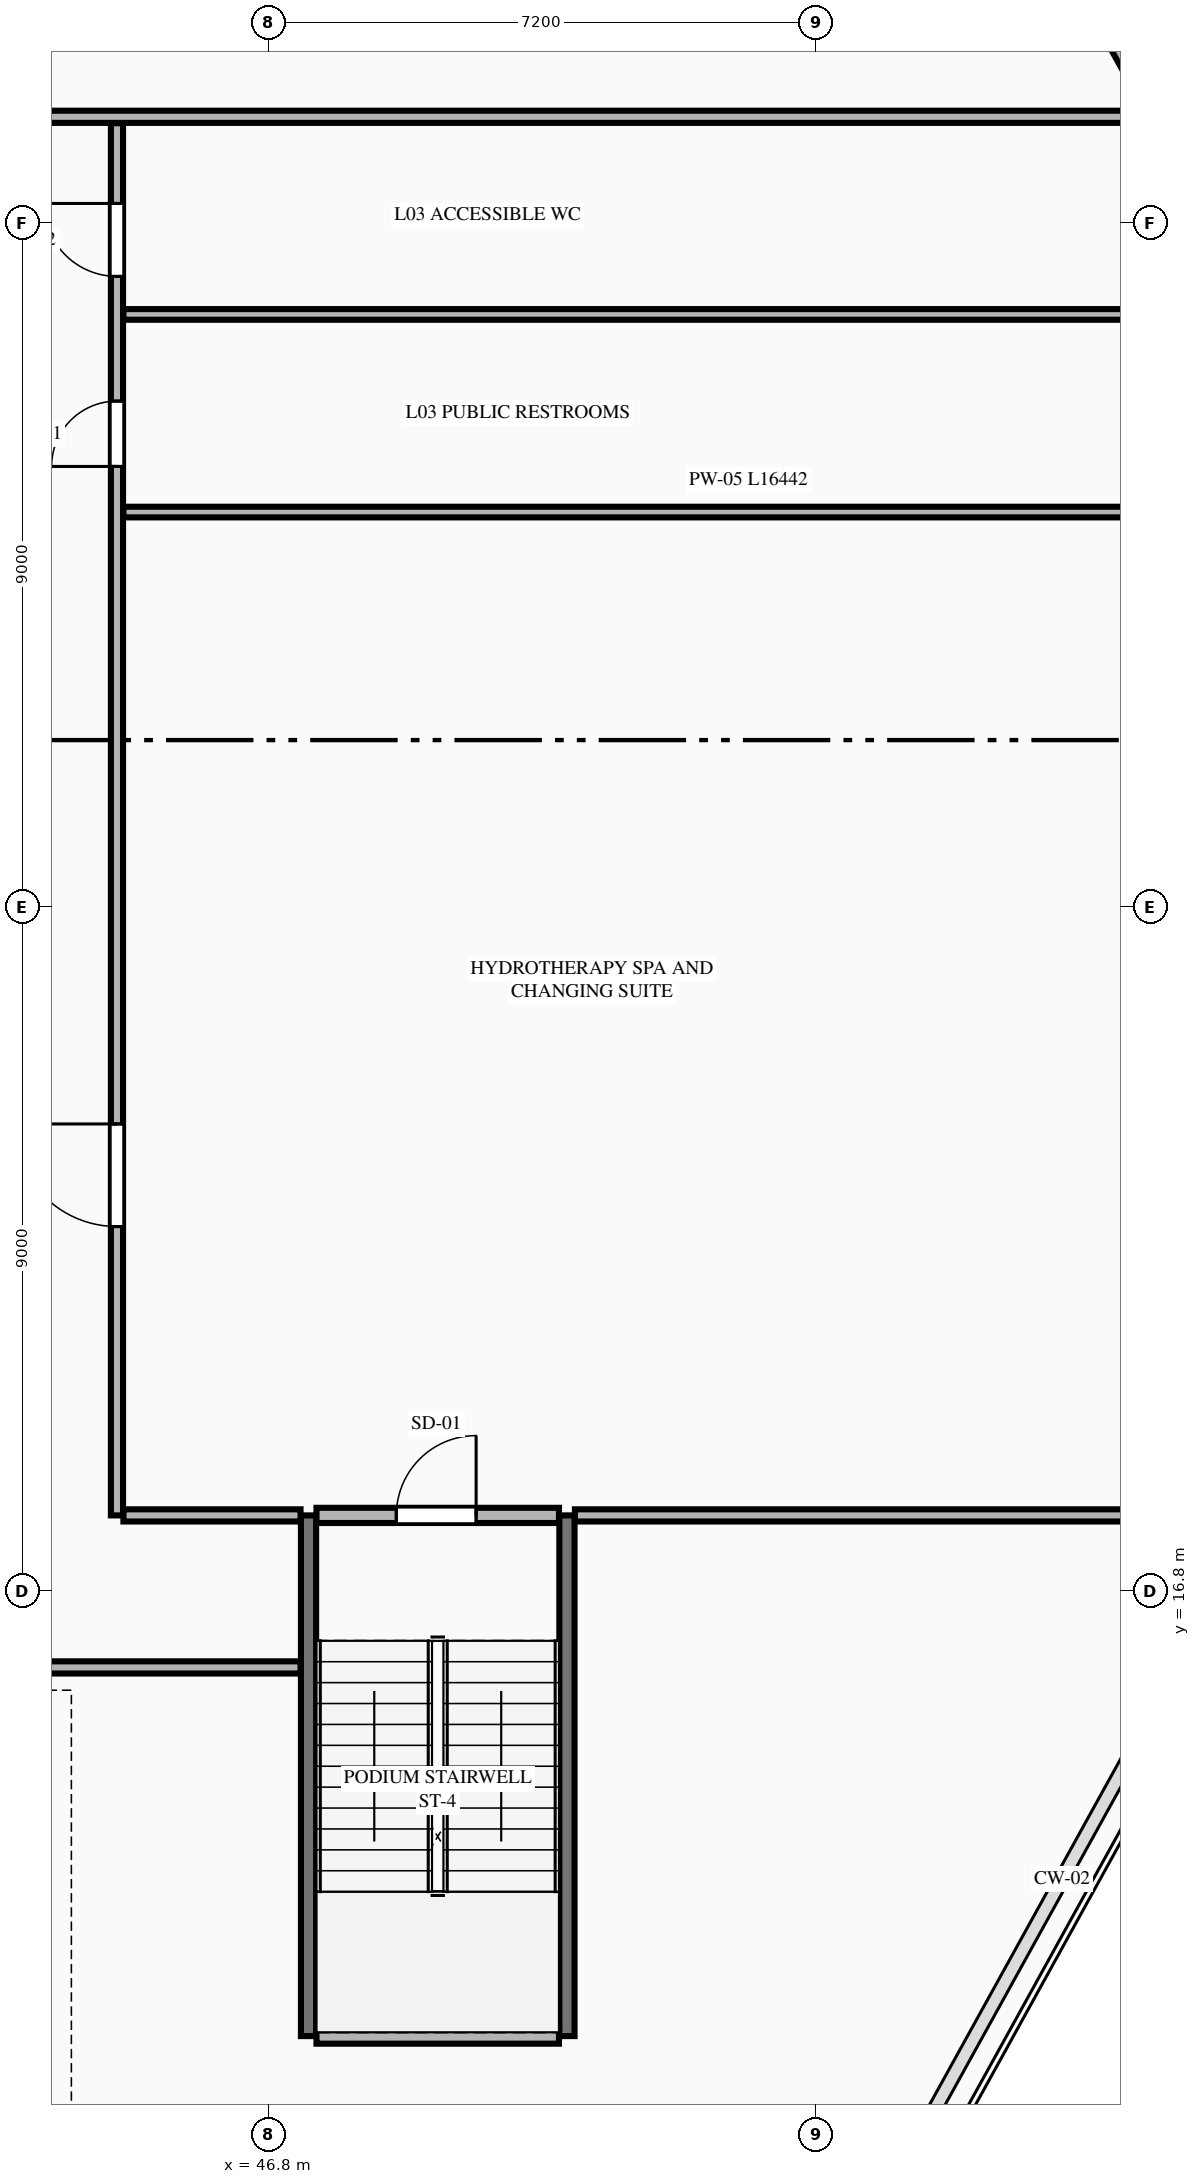
"""IFC4 building model, lengths in metres.
Left out: names, types, materials, properties, quantities, classifications, styles, units other than length and angle.
Written with IfcOpenShell. Run it as: python <this file> out.ifc"""

import sys

from ifc_helpers import new_model, si_unit, direction, frame, frame_2d, origin, place, context, subcontext, project, spatial, rectangle, extrude, element, fill, save


model = new_model("IFC4")
c1 = context("Model", 3, precision=1e-05, world=origin(), true_north=direction((0.0, 1.0)))
c2 = subcontext(c1, "Body", "Model", "MODEL_VIEW")
j1 = project(units=[si_unit("LENGTHUNIT", "METRE"), si_unit("PLANEANGLEUNIT", "RADIAN")], contexts=[c1])
p1 = place(None, origin())
s1 = spatial("IfcSite", under=j1, at=p1, CompositionType="ELEMENT")
p2 = place(p1, origin())
s2 = spatial("IfcBuilding", under=s1, at=p2, CompositionType="ELEMENT")
p3 = place(p2, frame((0.0, 0.0, 15.0)))
s3 = spatial("IfcBuildingStorey", under=s2, at=p3, CompositionType="ELEMENT", Elevation=15.0)
for number, where, z_axis, x_axis in (
    (1, (47.32, 10.95, 0.0), (0.0, 0.0, 1.0), (0.0, 1.0, 0.0)),
    (2, (50.72, 10.95, 0.0), (0.0, 0.0, 1.0), (0.0, 1.0, 0.0)),
):
    element("IfcWall", number, at=place(p3, frame(where, z_axis=z_axis, x_axis=x_axis)), inside=s3, PredefinedType="SHEAR", context=c2, shape_type="SweptSolid", body=[
        extrude(rectangle(XDim=6.85, YDim=0.2, at=frame_2d((3.425, 0.0))), origin(), (0.0, 0.0, 1.0), 4.5),
    ])
p4 = place(p3, frame((47.425, 10.95, 0.0), z_axis=(0.0, 0.0, 1.0), x_axis=(1.0, 0.0, 0.0)))
e3 = element("IfcWall", 3, at=p4, inside=s3, PredefinedType="PLUMBINGWALL", context=c2, shape_type="SweptSolid", body=[
    extrude(rectangle(XDim=3.19, YDim=0.2, at=frame_2d((1.595, 0.0))), origin(), (0.0, 0.0, 1.0), 4.22),
])
p5 = place(p3, frame((47.425, 17.8, 0.0), z_axis=(0.0, 0.0, 1.0), x_axis=(1.0, 0.0, 0.0)))
e4 = element("IfcWall", 4, at=p5, inside=s3, PredefinedType="PLUMBINGWALL", context=c2, shape_type="SweptSolid", body=[
    extrude(rectangle(XDim=3.19, YDim=0.2, at=frame_2d((1.595, 0.0))), origin(), (0.0, 0.0, 1.0), 4.22),
])
p6 = place(p5, frame((1.05, 0.0, 0.0)))
e5 = element("IfcOpeningElement", 5, at=p6, cuts=e4, PredefinedType="OPENING", context=c2, shape_type="SweptSolid", body=[
    extrude(rectangle(XDim=1.05, YDim=2.15, at=frame_2d((0.525, 1.075))), frame((0.0, 0.11, 0.0), z_axis=(0.0, -1.0, 0.0), x_axis=(1.0, 0.0, 0.0)), (0.0, 0.0, 1.0), 0.22),
])
p7 = place(p3, frame((17.625, 15.8, 0.0), z_axis=(0.0, 0.0, 1.0), x_axis=(1.0, 0.0, 0.0)))
e6 = element("IfcWall", 6, at=p7, inside=s3, PredefinedType="PARTITIONING", context=c2, shape_type="SweptSolid", body=[
    extrude(rectangle(XDim=29.59, YDim=0.16, at=frame_2d((14.795, 0.0))), origin(), (0.0, 0.0, 1.0), 4.22),
])
p8 = place(p7, frame((3.5, 0.0, 0.0)))
e7 = element("IfcOpeningElement", 7, at=p8, cuts=e6, PredefinedType="OPENING", context=c2, shape_type="SweptSolid", body=[
    extrude(rectangle(XDim=1.35, YDim=2.35, at=frame_2d((0.675, 1.175))), frame((0.0, 0.09, 0.0), z_axis=(0.0, -1.0, 0.0), x_axis=(1.0, 0.0, 0.0)), (0.0, 0.0, 1.0), 0.18),
])
p9 = place(p7, frame((24.5, 0.0, 0.0)))
e8 = element("IfcOpeningElement", 8, at=p9, cuts=e6, PredefinedType="OPENING", context=c2, shape_type="SweptSolid", body=[
    extrude(rectangle(XDim=1.35, YDim=2.35, at=frame_2d((0.675, 1.175))), frame((0.0, 0.09, 0.0), z_axis=(0.0, -1.0, 0.0), x_axis=(1.0, 0.0, 0.0)), (0.0, 0.0, 1.0), 0.18),
])
p10 = place(p3, frame((44.885, 17.8, 0.0), z_axis=(0.0, 0.0, 1.0), x_axis=(1.0, 0.0, 0.0)))
e9 = element("IfcWall", 9, at=p10, inside=s3, PredefinedType="PARTITIONING", context=c2, shape_type="SweptSolid", body=[
    extrude(rectangle(XDim=2.33, YDim=0.16, at=frame_2d((1.165, 0.0))), origin(), (0.0, 0.0, 1.0), 4.22),
])
p11 = place(p3, frame((50.825, 17.8, 0.0), z_axis=(0.0, 0.0, 1.0), x_axis=(1.0, 0.0, 0.0)))
e10 = element("IfcWall", 10, at=p11, inside=s3, PredefinedType="PARTITIONING", context=c2, shape_type="SweptSolid", body=[
    extrude(rectangle(XDim=8.955, YDim=0.16, at=frame_2d((4.478, 0.0))), origin(), (0.0, 0.0, 1.0), 4.22),
])
p12 = place(p3, frame((44.8, 17.8, 0.0), z_axis=(0.0, 0.0, 1.0), x_axis=(0.0, 1.0, 0.0)))
e11 = element("IfcWall", 11, at=p12, inside=s3, PredefinedType="PARTITIONING", context=c2, shape_type="SweptSolid", body=[
    extrude(rectangle(XDim=18.315, YDim=0.16, at=frame_2d((9.157, 0.0))), origin(), (0.0, 0.0, 1.0), 4.22),
])
p13 = place(p12, frame((3.8, 0.0, 0.0)))
e12 = element("IfcOpeningElement", 12, at=p13, cuts=e11, PredefinedType="OPENING", context=c2, shape_type="SweptSolid", body=[
    extrude(rectangle(XDim=1.35, YDim=2.35, at=frame_2d((0.675, 1.175))), frame((0.0, 0.09, 0.0), z_axis=(0.0, -1.0, 0.0), x_axis=(1.0, 0.0, 0.0)), (0.0, 0.0, 1.0), 0.18),
])
p14 = place(p12, frame((13.8, 0.0, 0.0)))
e13 = element("IfcOpeningElement", 13, at=p14, cuts=e11, PredefinedType="OPENING", context=c2, shape_type="SweptSolid", body=[
    extrude(rectangle(XDim=0.86, YDim=2.1, at=frame_2d((0.43, 1.05))), frame((0.0, 0.09, 0.0), z_axis=(0.0, -1.0, 0.0), x_axis=(1.0, 0.0, 0.0)), (0.0, 0.0, 1.0), 0.18),
])
p15 = place(p12, frame((16.3, 0.0, 0.0)))
e14 = element("IfcOpeningElement", 14, at=p15, cuts=e11, PredefinedType="OPENING", context=c2, shape_type="SweptSolid", body=[
    extrude(rectangle(XDim=0.96, YDim=2.15, at=frame_2d((0.48, 1.075))), frame((0.0, 0.09, 0.0), z_axis=(0.0, -1.0, 0.0), x_axis=(1.0, 0.0, 0.0)), (0.0, 0.0, 1.0), 0.18),
])
p16 = place(p3, frame((6.346, 36.2, 0.0), z_axis=(0.0, 0.0, 1.0), x_axis=(1.0, 0.0, 0.0)))
e15 = element("IfcWall", 15, at=p16, inside=s3, PredefinedType="PARTITIONING", context=c2, shape_type="SweptSolid", body=[
    extrude(rectangle(XDim=52.108, YDim=0.16, at=frame_2d((26.054, 0.0))), origin(), (0.0, 0.0, 1.0), 4.22),
])
p17 = place(p16, frame((6.5, 0.0, 0.0)))
e16 = element("IfcOpeningElement", 16, at=p17, cuts=e15, PredefinedType="OPENING", context=c2, shape_type="SweptSolid", body=[
    extrude(rectangle(XDim=1.35, YDim=2.35, at=frame_2d((0.675, 1.175))), frame((0.0, 0.09, 0.0), z_axis=(0.0, -1.0, 0.0), x_axis=(1.0, 0.0, 0.0)), (0.0, 0.0, 1.0), 0.18),
])
p18 = place(p16, frame((26.5, 0.0, 0.0)))
e17 = element("IfcOpeningElement", 17, at=p18, cuts=e15, PredefinedType="OPENING", context=c2, shape_type="SweptSolid", body=[
    extrude(rectangle(XDim=1.35, YDim=2.35, at=frame_2d((0.675, 1.175))), frame((0.0, 0.09, 0.0), z_axis=(0.0, -1.0, 0.0), x_axis=(1.0, 0.0, 0.0)), (0.0, 0.0, 1.0), 0.18),
])
p19 = place(p3, frame((44.885, 31.0, 0.0), z_axis=(0.0, 0.0, 1.0), x_axis=(1.0, 0.0, 0.0)))
e18 = element("IfcWall", 18, at=p19, inside=s3, PredefinedType="PLUMBINGWALL", context=c2, shape_type="SweptSolid", body=[
    extrude(rectangle(XDim=16.442, YDim=0.14, at=frame_2d((8.221, 0.0))), origin(), (0.0, 0.0, 1.0), 4.22),
])
p20 = place(p3, frame((44.885, 33.6, 0.0), z_axis=(0.0, 0.0, 1.0), x_axis=(1.0, 0.0, 0.0)))
e19 = element("IfcWall", 19, at=p20, inside=s3, PredefinedType="PLUMBINGWALL", context=c2, shape_type="SweptSolid", body=[
    extrude(rectangle(XDim=15.006, YDim=0.14, at=frame_2d((7.503, 0.0))), origin(), (0.0, 0.0, 1.0), 4.22),
])
p21 = place(p3, frame((60.381, 32.889, 0.0), z_axis=(0.0, 0.0, 1.0), x_axis=(-0.483690649574, 0.875239027646, 0.0)))
e20 = element("IfcWall", 20, at=p21, inside=s3, PredefinedType="STANDARD", context=c2, shape_type="SweptSolid", body=[
    extrude(rectangle(XDim=13.015, YDim=0.32, at=frame_2d((6.507, 0.0))), origin(), (0.0, 0.0, 1.0), 4.22),
])
p22 = place(p21, frame((1.439, 0.0, 0.75)))
e21 = element("IfcOpeningElement", 21, at=p22, cuts=e20, PredefinedType="OPENING", context=c2, shape_type="SweptSolid", body=[
    extrude(rectangle(XDim=1.8, YDim=2.4, at=frame_2d((0.9, 1.2))), frame((0.0, 0.17, 0.0), z_axis=(0.0, -1.0, 0.0), x_axis=(1.0, 0.0, 0.0)), (0.0, 0.0, 1.0), 0.34),
])
p23 = place(p21, frame((7.943, 0.0, 0.75)))
e22 = element("IfcOpeningElement", 22, at=p23, cuts=e20, PredefinedType="OPENING", context=c2, shape_type="SweptSolid", body=[
    extrude(rectangle(XDim=1.1, YDim=2.0, at=frame_2d((0.55, 1.0))), frame((0.0, 0.17, 0.0), z_axis=(0.0, -1.0, 0.0), x_axis=(1.0, 0.0, 0.0)), (0.0, 0.0, 1.0), 0.34),
])
p24 = place(p6, origin())
e23 = element("IfcDoor", 23, at=p24, inside=s3, OperationType="SINGLE_SWING_RIGHT", PredefinedType="DOOR", context=c2, shape_type="SweptSolid", body=[
    extrude(rectangle(XDim=1.05, YDim=2.15, at=frame_2d((0.525, 1.075))), frame((0.0, 0.025, 0.0), z_axis=(0.0, -1.0, 0.0), x_axis=(1.0, 0.0, 0.0)), (0.0, 0.0, 1.0), 0.05),
])
fill(e5, e23)
p25 = place(p13, origin())
e24 = element("IfcDoor", 24, at=p25, inside=s3, OperationType="SINGLE_SWING_RIGHT", PredefinedType="DOOR", context=c2, shape_type="SweptSolid", body=[
    extrude(rectangle(XDim=1.35, YDim=2.35, at=frame_2d((0.675, 1.175))), frame((0.0, 0.025, 0.0), z_axis=(0.0, -1.0, 0.0), x_axis=(1.0, 0.0, 0.0)), (0.0, 0.0, 1.0), 0.05),
])
fill(e12, e24)
p26 = place(p14, origin())
e25 = element("IfcDoor", 25, at=p26, inside=s3, OperationType="SINGLE_SWING_LEFT", PredefinedType="DOOR", context=c2, shape_type="SweptSolid", body=[
    extrude(rectangle(XDim=0.86, YDim=2.1, at=frame_2d((0.43, 1.05))), frame((0.0, 0.025, 0.0), z_axis=(0.0, -1.0, 0.0), x_axis=(1.0, 0.0, 0.0)), (0.0, 0.0, 1.0), 0.05),
])
fill(e13, e25)
p27 = place(p15, origin())
e26 = element("IfcDoor", 26, at=p27, inside=s3, OperationType="SINGLE_SWING_RIGHT", PredefinedType="DOOR", context=c2, shape_type="SweptSolid", body=[
    extrude(rectangle(XDim=0.96, YDim=2.15, at=frame_2d((0.48, 1.075))), frame((0.0, 0.025, 0.0), z_axis=(0.0, -1.0, 0.0), x_axis=(1.0, 0.0, 0.0)), (0.0, 0.0, 1.0), 0.05),
])
fill(e14, e26)
save(model, sys.argv[1])
